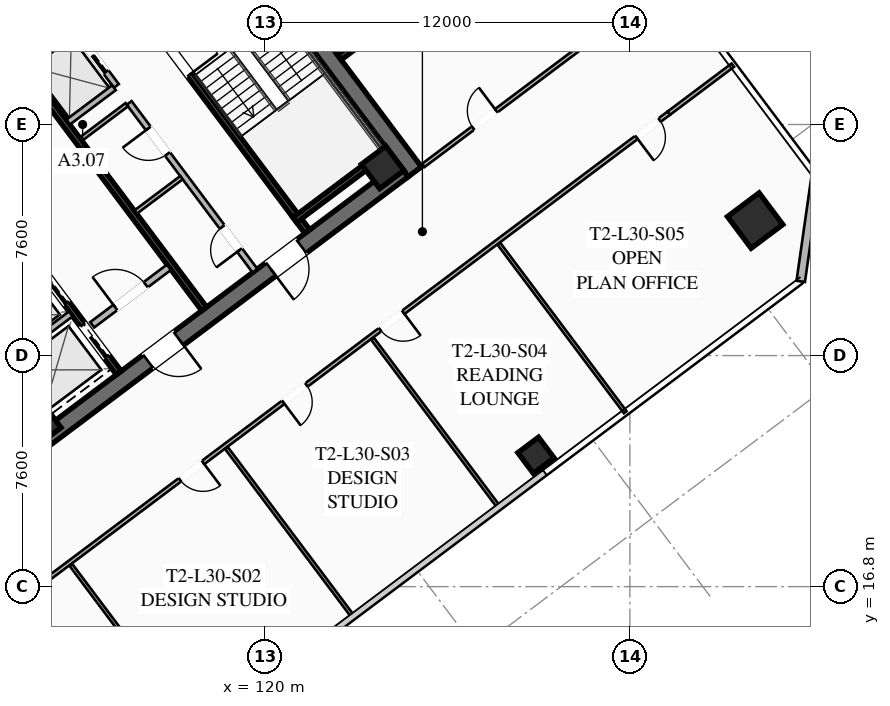
"""IFC4 building model, lengths in metres.
Left out: names, types, materials, properties, quantities, classifications, styles, units other than length and angle.
Written with IfcOpenShell. Run it as: python <this file> out.ifc"""

import sys

from ifc_helpers import new_model, si_unit, direction, frame, frame_2d, origin, origin_2d, place, context, subcontext, project, spatial, rectangle, hollow_rectangle, extrude, element, fill, save


model = new_model("IFC4")
c1 = context("Model", 3, precision=1e-05, world=origin(), true_north=direction((0.0, 1.0)))
c2 = subcontext(c1, "Body", "Model", "MODEL_VIEW")
j1 = project(units=[si_unit("LENGTHUNIT", "METRE"), si_unit("PLANEANGLEUNIT", "RADIAN")], contexts=[c1])
p1 = place(None, origin())
s1 = spatial("IfcSite", under=j1, at=p1, CompositionType="ELEMENT")
p2 = place(p1, origin())
s2 = spatial("IfcBuilding", under=s1, at=p2, CompositionType="ELEMENT")
p3 = place(p2, frame((0.0, 0.0, 114.4)))
s3 = spatial("IfcBuildingStorey", under=s2, at=p3, CompositionType="ELEMENT", Elevation=114.4)
p4 = place(p3, frame((115.564, 42.923, 0.0), z_axis=(0.0, 0.0, 1.0), x_axis=(0.600005007985, -0.799996243986, 0.0)))
e1 = element("IfcWall", 1, at=p4, inside=s3, PredefinedType="SHEAR", context=c2, shape_type="SweptSolid", body=[
    extrude(rectangle(XDim=15.6, YDim=0.55, at=frame_2d((7.8, 0.0))), origin(), (0.0, 0.0, 1.0), 3.55),
])
p5 = place(p3, frame((124.539, 30.498, 0.0), z_axis=(0.0, 0.0, 1.0), x_axis=(-0.799998054672, -0.600002593761, 0.0)))
e2 = element("IfcWall", 2, at=p5, inside=s3, PredefinedType="SHEAR", context=c2, shape_type="SweptSolid", body=[
    extrude(rectangle(XDim=15.06, YDim=0.55, at=frame_2d((7.53, 0.0))), origin(), (0.0, 0.0, 1.0), 3.55),
])
p6 = place(p5, frame((9.23, 0.0, 0.0)))
e3 = element("IfcOpeningElement", 3, at=p6, cuts=e2, PredefinedType="OPENING", context=c2, shape_type="SweptSolid", body=[
    extrude(rectangle(XDim=1.25, YDim=2.25, at=frame_2d((0.625, 1.125))), frame((0.0, 0.285, 0.0), z_axis=(0.0, -1.0, 0.0), x_axis=(1.0, 0.0, 0.0)), (0.0, 0.0, 1.0), 0.57),
])
p7 = place(p5, frame((4.18, 0.0, 0.0)))
e4 = element("IfcOpeningElement", 4, at=p7, cuts=e2, PredefinedType="OPENING", context=c2, shape_type="SweptSolid", body=[
    extrude(rectangle(XDim=1.25, YDim=2.25, at=frame_2d((0.625, 1.125))), frame((0.0, 0.285, 0.0), z_axis=(0.0, -1.0, 0.0), x_axis=(1.0, 0.0, 0.0)), (0.0, 0.0, 1.0), 0.57),
])
p8 = place(p3, frame((103.461, 33.502, 0.0), z_axis=(0.0, 0.0, 1.0), x_axis=(0.799998054672, 0.600002593761, 0.0)))
e5 = element("IfcWall", 5, at=p8, inside=s3, PredefinedType="SHEAR", context=c2, shape_type="SweptSolid", body=[
    extrude(rectangle(XDim=15.06, YDim=0.55, at=frame_2d((7.53, 0.0))), origin(), (0.0, 0.0, 1.0), 3.55),
])
p9 = place(p8, frame((4.58, 0.0, 0.0)))
e6 = element("IfcOpeningElement", 6, at=p9, cuts=e5, PredefinedType="OPENING", context=c2, shape_type="SweptSolid", body=[
    extrude(rectangle(XDim=1.25, YDim=2.25, at=frame_2d((0.625, 1.125))), frame((0.0, 0.285, 0.0), z_axis=(0.0, -1.0, 0.0), x_axis=(1.0, 0.0, 0.0)), (0.0, 0.0, 1.0), 0.57),
])
p10 = place(p8, frame((9.63, 0.0, 0.0)))
e7 = element("IfcOpeningElement", 7, at=p10, cuts=e5, PredefinedType="OPENING", context=c2, shape_type="SweptSolid", body=[
    extrude(rectangle(XDim=1.25, YDim=2.25, at=frame_2d((0.625, 1.125))), frame((0.0, 0.285, 0.0), z_axis=(0.0, -1.0, 0.0), x_axis=(1.0, 0.0, 0.0)), (0.0, 0.0, 1.0), 0.57),
])
for number, where, z_axis, x_axis in (
    (8, (112.59, 22.13, 0.0), (0.0, 0.0, 1.0), (0.8, 0.6, 0.0)),
    (9, (123.87, 30.59, 0.0), (0.0, 0.0, 1.0), (0.8, 0.6, 0.0)),
):
    element("IfcColumn", number, at=place(p3, frame(where, z_axis=z_axis, x_axis=x_axis)), inside=s3, PredefinedType="COLUMN", context=c2, shape_type="SweptSolid", body=[
        extrude(hollow_rectangle(XDim=1.0, YDim=1.0, WallThickness=0.04, at=origin_2d()), origin(), (0.0, 0.0, 1.0), 3.37),
    ])
p11 = place(p3, frame((136.12, 28.84, 0.0), z_axis=(0.0, 0.0, 1.0), x_axis=(0.799999996291, 0.600000004945, 0.0)))
e10 = element("IfcColumn", 10, at=p11, inside=s3, PredefinedType="COLUMN", context=c2, shape_type="SweptSolid", body=[
    extrude(hollow_rectangle(XDim=1.3, YDim=1.3, WallThickness=0.05, at=origin_2d()), origin(), (0.0, 0.0, 1.0), 3.37),
])
p12 = place(p3, frame((128.91, 21.12, 0.0), z_axis=(0.0, 0.0, 1.0), x_axis=(0.799999996291, 0.600000004945, 0.0)))
e11 = element("IfcColumn", 11, at=p12, inside=s3, PredefinedType="COLUMN", context=c2, shape_type="SweptSolid", body=[
    extrude(hollow_rectangle(XDim=0.85, YDim=0.85, WallThickness=0.035, at=origin_2d()), origin(), (0.0, 0.0, 1.0), 3.37),
])
p13 = place(p3, frame((138.12, 30.34, 0.0), z_axis=(0.0, 0.0, 1.0), x_axis=(-0.141421356237, -0.989949493661, 0.0)))
e12 = element("IfcWall", 12, at=p13, inside=s3, PredefinedType="SOLIDWALL", context=c2, shape_type="SweptSolid", body=[
    extrude(rectangle(XDim=3.536, YDim=0.28, at=frame_2d((1.768, 0.0))), origin(), (0.0, 0.0, 1.0), 3.37),
])
p14 = place(p3, frame((116.56, 34.92, 0.0), z_axis=(0.0, 0.0, 1.0), x_axis=(0.59999029481, -0.8000072788, 0.0)))
e13 = element("IfcWall", 13, at=p14, inside=s3, PredefinedType="SHEAR", context=c2, shape_type="SweptSolid", body=[
    extrude(rectangle(XDim=8.05, YDim=0.2, at=frame_2d((4.025, 0.0))), origin(), (0.0, 0.0, 1.0), 3.37),
])
p15 = place(p14, frame((0.45, 0.0, 0.0)))
e14 = element("IfcOpeningElement", 14, at=p15, cuts=e13, PredefinedType="OPENING", context=c2, shape_type="SweptSolid", body=[
    extrude(rectangle(XDim=1.15, YDim=2.2, at=frame_2d((0.575, 1.1))), frame((0.0, 0.11, 0.0), z_axis=(0.0, -1.0, 0.0), x_axis=(1.0, 0.0, 0.0)), (0.0, 0.0, 1.0), 0.22),
])
p16 = place(p3, frame((120.98, 28.86, 0.0), z_axis=(0.0, 0.0, 1.0), x_axis=(0.800015298837, 0.599979601008, 0.0)))
e15 = element("IfcWall", 15, at=p16, inside=s3, PredefinedType="SHEAR", context=c2, shape_type="SweptSolid", body=[
    extrude(rectangle(XDim=3.83, YDim=0.2, at=frame_2d((1.915, 0.0))), origin(), (0.0, 0.0, 1.0), 3.37),
])
p17 = place(p3, frame((117.998, 25.936, 0.0), z_axis=(0.0, 0.0, 1.0), x_axis=(-0.600002693989, 0.799997979501, 0.0)))
e16 = element("IfcWall", 16, at=p17, inside=s3, PredefinedType="SHEAR", context=c2, shape_type="SweptSolid", body=[
    extrude(rectangle(XDim=14.5, YDim=0.2, at=frame_2d((7.25, 0.0))), origin(), (0.0, 0.0, 1.0), 3.37),
])
p18 = place(p3, frame((114.316, 25.412, 0.0), z_axis=(0.0, 0.0, 1.0), x_axis=(0.800018601094, 0.59997519774, 0.0)))
e17 = element("IfcWall", 17, at=p18, inside=s3, PredefinedType="SOLIDWALL", context=c2, shape_type="SweptSolid", body=[
    extrude(rectangle(XDim=3.15, YDim=0.22, at=frame_2d((1.575, 0.0))), origin(), (0.0, 0.0, 1.0), 2.723),
])
p19 = place(p18, frame((0.95, 0.0, 0.0)))
e18 = element("IfcOpeningElement", 18, at=p19, cuts=e17, PredefinedType="OPENING", context=c2, shape_type="SweptSolid", body=[
    extrude(rectangle(XDim=1.25, YDim=2.25, at=frame_2d((0.625, 1.125))), frame((0.0, 0.12, 0.0), z_axis=(0.0, -1.0, 0.0), x_axis=(1.0, 0.0, 0.0)), (0.0, 0.0, 1.0), 0.24),
])
p20 = place(p3, frame((115.19, 23.83, 0.0), z_axis=(0.0, 0.0, 1.0), x_axis=(-0.599993943644, 0.800004542231, 0.0)))
e19 = element("IfcWall", 19, at=p20, inside=s3, PredefinedType="SHEAR", context=c2, shape_type="SweptSolid", body=[
    extrude(rectangle(XDim=6.45, YDim=0.2, at=frame_2d((3.225, 0.0))), origin(), (0.0, 0.0, 1.0), 3.37),
])
p21 = place(p20, frame((4.875, 0.0, 0.0)))
e20 = element("IfcOpeningElement", 20, at=p21, cuts=e19, PredefinedType="OPENING", context=c2, shape_type="SweptSolid", body=[
    extrude(rectangle(XDim=1.3, YDim=2.25, at=frame_2d((0.65, 1.125))), frame((0.0, 0.11, 0.0), z_axis=(0.0, -1.0, 0.0), x_axis=(1.0, 0.0, 0.0)), (0.0, 0.0, 1.0), 0.22),
])
p22 = place(p20, frame((2.875, 0.0, 0.0)))
e21 = element("IfcOpeningElement", 21, at=p22, cuts=e19, PredefinedType="OPENING", context=c2, shape_type="SweptSolid", body=[
    extrude(rectangle(XDim=1.3, YDim=2.25, at=frame_2d((0.65, 1.125))), frame((0.0, 0.11, 0.0), z_axis=(0.0, -1.0, 0.0), x_axis=(1.0, 0.0, 0.0)), (0.0, 0.0, 1.0), 0.22),
])
p23 = place(p20, frame((0.675, 0.0, 0.0)))
e22 = element("IfcOpeningElement", 22, at=p23, cuts=e19, PredefinedType="OPENING", context=c2, shape_type="SweptSolid", body=[
    extrude(rectangle(XDim=1.3, YDim=2.25, at=frame_2d((0.65, 1.125))), frame((0.0, 0.11, 0.0), z_axis=(0.0, -1.0, 0.0), x_axis=(1.0, 0.0, 0.0)), (0.0, 0.0, 1.0), 0.22),
])
p24 = place(p3, frame((110.826, 23.682, 0.0), z_axis=(0.0, 0.0, 1.0), x_axis=(0.8, 0.6, 0.0)))
e23 = element("IfcWall", 23, at=p24, inside=s3, PredefinedType="SOLIDWALL", context=c2, shape_type="SweptSolid", body=[
    extrude(rectangle(XDim=3.48, YDim=0.2, at=frame_2d((1.74, 0.0))), origin(), (0.0, 0.0, 1.0), 3.37),
])
p25 = place(p3, frame((119.67, 27.19, 0.0), z_axis=(0.0, 0.0, 1.0), x_axis=(-0.599988677396, 0.800008491828, 0.0)))
e24 = element("IfcWall", 24, at=p25, inside=s3, PredefinedType="SOLIDWALL", context=c2, shape_type="SweptSolid", body=[
    extrude(rectangle(XDim=6.9, YDim=0.2, at=frame_2d((3.45, 0.0))), origin(), (0.0, 0.0, 1.0), 2.723),
])
p26 = place(p25, frame((0.85, 0.0, 0.0)))
e25 = element("IfcOpeningElement", 25, at=p26, cuts=e24, PredefinedType="OPENING", context=c2, shape_type="SweptSolid", body=[
    extrude(rectangle(XDim=0.95, YDim=2.05, at=frame_2d((0.475, 1.025))), frame((0.0, 0.11, 0.0), z_axis=(0.0, -1.0, 0.0), x_axis=(1.0, 0.0, 0.0)), (0.0, 0.0, 1.0), 0.22),
])
p27 = place(p25, frame((4.8, 0.0, 0.0)))
e26 = element("IfcOpeningElement", 26, at=p27, cuts=e24, PredefinedType="OPENING", context=c2, shape_type="SweptSolid", body=[
    extrude(rectangle(XDim=1.05, YDim=2.2, at=frame_2d((0.525, 1.1))), frame((0.0, 0.11, 0.0), z_axis=(0.0, -1.0, 0.0), x_axis=(1.0, 0.0, 0.0)), (0.0, 0.0, 1.0), 0.22),
])
for number, where, z_axis, x_axis in (
    (27, (113.946, 31.522, 0.0), (0.0, 0.0, 1.0), (0.8, 0.6, 0.0)),
    (28, (115.746, 29.122, 0.0), (0.0, 0.0, 1.0), (0.8, 0.6, 0.0)),
):
    element("IfcWall", number, at=place(p3, frame(where, z_axis=z_axis, x_axis=x_axis)), inside=s3, PredefinedType="PARTITIONING", context=c2, shape_type="SweptSolid", body=[
        extrude(rectangle(XDim=1.88, YDim=0.135, at=frame_2d((0.94, 0.0))), origin(), (0.0, 0.0, 1.0), 2.723),
    ])
p28 = place(p3, frame((115.11, 33.27, 0.0), z_axis=(0.0, 0.0, 1.0), x_axis=(-0.600011322243, 0.799991508192, 0.0)))
e29 = element("IfcWall", 29, at=p28, inside=s3, PredefinedType="SOLIDWALL", context=c2, shape_type="SweptSolid", body=[
    extrude(rectangle(XDim=6.9, YDim=0.2, at=frame_2d((3.45, 0.0))), origin(), (0.0, 0.0, 1.0), 3.37),
])
p29 = place(p28, frame((0.575, 0.0, 0.0)))
e30 = element("IfcOpeningElement", 30, at=p29, cuts=e29, PredefinedType="OPENING", context=c2, shape_type="SweptSolid", body=[
    extrude(rectangle(XDim=1.1, YDim=2.2, at=frame_2d((0.55, 1.1))), frame((0.0, 0.11, 0.0), z_axis=(0.0, -1.0, 0.0), x_axis=(1.0, 0.0, 0.0)), (0.0, 0.0, 1.0), 0.22),
])
p30 = place(p28, frame((2.825, 0.0, 0.0)))
e31 = element("IfcOpeningElement", 31, at=p30, cuts=e29, PredefinedType="OPENING", context=c2, shape_type="SweptSolid", body=[
    extrude(rectangle(XDim=1.1, YDim=2.2, at=frame_2d((0.55, 1.1))), frame((0.0, 0.11, 0.0), z_axis=(0.0, -1.0, 0.0), x_axis=(1.0, 0.0, 0.0)), (0.0, 0.0, 1.0), 0.22),
])
p31 = place(p28, frame((5.075, 0.0, 0.0)))
e32 = element("IfcOpeningElement", 32, at=p31, cuts=e29, PredefinedType="OPENING", context=c2, shape_type="SweptSolid", body=[
    extrude(rectangle(XDim=1.1, YDim=2.2, at=frame_2d((0.55, 1.1))), frame((0.0, 0.11, 0.0), z_axis=(0.0, -1.0, 0.0), x_axis=(1.0, 0.0, 0.0)), (0.0, 0.0, 1.0), 0.22),
])
p32 = place(p3, frame((113.526, 32.082, 0.0), z_axis=(0.0, 0.0, 1.0), x_axis=(0.800046745961, 0.599937666993, 0.0)))
e33 = element("IfcWall", 33, at=p32, inside=s3, PredefinedType="SOLIDWALL", context=c2, shape_type="SweptSolid", body=[
    extrude(rectangle(XDim=1.88, YDim=0.2, at=frame_2d((0.94, 0.0))), origin(), (0.0, 0.0, 1.0), 3.37),
])
p33 = place(p3, frame((112.176, 33.882, 0.0), z_axis=(0.0, 0.0, 1.0), x_axis=(0.8, 0.6, 0.0)))
e34 = element("IfcWall", 34, at=p33, inside=s3, PredefinedType="SOLIDWALL", context=c2, shape_type="SweptSolid", body=[
    extrude(rectangle(XDim=1.88, YDim=0.2, at=frame_2d((0.94, 0.0))), origin(), (0.0, 0.0, 1.0), 3.37),
])
p34 = place(p3, frame((122.444, 34.208, 0.0), z_axis=(0.0, 0.0, 1.0), x_axis=(0.79999138319, 0.600011488909, 0.0)))
e35 = element("IfcWall", 35, at=p34, inside=s3, PredefinedType="SHEAR", context=c2, shape_type="SweptSolid", body=[
    extrude(rectangle(XDim=3.4, YDim=0.2, at=frame_2d((1.7, 0.0))), origin(), (0.0, 0.0, 1.0), 3.37),
])
p35 = place(p3, frame((95.87, 30.09, 0.0), z_axis=(0.0, 0.0, 1.0), x_axis=(0.799997191971, 0.600003744021, 0.0)))
e36 = element("IfcWall", 36, at=p35, inside=s3, PredefinedType="PARTITIONING", context=c2, shape_type="SweptSolid", body=[
    extrude(rectangle(XDim=31.3, YDim=0.135, at=frame_2d((15.65, 0.0))), origin(), (0.0, 0.0, 1.0), 2.723),
])
p36 = place(p35, frame((0.3, 0.0, 0.0)))
e37 = element("IfcOpeningElement", 37, at=p36, cuts=e36, PredefinedType="OPENING", context=c2, shape_type="SweptSolid", body=[
    extrude(rectangle(XDim=0.95, YDim=2.05, at=frame_2d((0.475, 1.025))), frame((0.0, 0.077, 0.0), z_axis=(0.0, -1.0, 0.0), x_axis=(1.0, 0.0, 0.0)), (0.0, 0.0, 1.0), 0.155),
])
p37 = place(p35, frame((30.05, 0.0, 0.0)))
e38 = element("IfcOpeningElement", 38, at=p37, cuts=e36, PredefinedType="OPENING", context=c2, shape_type="SweptSolid", body=[
    extrude(rectangle(XDim=0.95, YDim=2.05, at=frame_2d((0.475, 1.025))), frame((0.0, 0.077, 0.0), z_axis=(0.0, -1.0, 0.0), x_axis=(1.0, 0.0, 0.0)), (0.0, 0.0, 1.0), 0.155),
])
p38 = place(p3, frame((133.282, 32.374, 0.0), z_axis=(0.0, 0.0, 1.0), x_axis=(-0.8, -0.6, 0.0)))
e39 = element("IfcWall", 39, at=p38, inside=s3, PredefinedType="PARTITIONING", context=c2, shape_type="SweptSolid", body=[
    extrude(rectangle(XDim=31.3, YDim=0.135, at=frame_2d((15.65, 0.0))), origin(), (0.0, 0.0, 1.0), 2.723),
])
p39 = place(p38, frame((29.97, 0.0, 0.0)))
e40 = element("IfcOpeningElement", 40, at=p39, cuts=e39, PredefinedType="OPENING", context=c2, shape_type="SweptSolid", body=[
    extrude(rectangle(XDim=0.95, YDim=2.05, at=frame_2d((0.475, 1.025))), frame((0.0, 0.077, 0.0), z_axis=(0.0, -1.0, 0.0), x_axis=(1.0, 0.0, 0.0)), (0.0, 0.0, 1.0), 0.155),
])
p40 = place(p38, frame((19.151, 0.0, 0.0)))
e41 = element("IfcOpeningElement", 41, at=p40, cuts=e39, PredefinedType="OPENING", context=c2, shape_type="SweptSolid", body=[
    extrude(rectangle(XDim=0.95, YDim=2.05, at=frame_2d((0.475, 1.025))), frame((0.0, 0.077, 0.0), z_axis=(0.0, -1.0, 0.0), x_axis=(1.0, 0.0, 0.0)), (0.0, 0.0, 1.0), 0.155),
])
p41 = place(p38, frame((14.901, 0.0, 0.0)))
e42 = element("IfcOpeningElement", 42, at=p41, cuts=e39, PredefinedType="OPENING", context=c2, shape_type="SweptSolid", body=[
    extrude(rectangle(XDim=0.95, YDim=2.05, at=frame_2d((0.475, 1.025))), frame((0.0, 0.077, 0.0), z_axis=(0.0, -1.0, 0.0), x_axis=(1.0, 0.0, 0.0)), (0.0, 0.0, 1.0), 0.155),
])
p42 = place(p38, frame((10.92, 0.0, 0.0)))
e43 = element("IfcOpeningElement", 43, at=p42, cuts=e39, PredefinedType="OPENING", context=c2, shape_type="SweptSolid", body=[
    extrude(rectangle(XDim=0.95, YDim=2.05, at=frame_2d((0.475, 1.025))), frame((0.0, 0.077, 0.0), z_axis=(0.0, -1.0, 0.0), x_axis=(1.0, 0.0, 0.0)), (0.0, 0.0, 1.0), 0.155),
])
p43 = place(p38, frame((0.38, 0.0, 0.0)))
e44 = element("IfcOpeningElement", 44, at=p43, cuts=e39, PredefinedType="OPENING", context=c2, shape_type="SweptSolid", body=[
    extrude(rectangle(XDim=0.95, YDim=2.05, at=frame_2d((0.475, 1.025))), frame((0.0, 0.077, 0.0), z_axis=(0.0, -1.0, 0.0), x_axis=(1.0, 0.0, 0.0)), (0.0, 0.0, 1.0), 0.155),
])
p44 = place(p3, frame((133.282, 32.374, 0.0), z_axis=(0.0, 0.0, 1.0), x_axis=(0.80002227902, 0.599970293491, 0.0)))
e45 = element("IfcWall", 45, at=p44, inside=s3, PredefinedType="PARTITIONING", context=c2, shape_type="SweptSolid", body=[
    extrude(rectangle(XDim=2.63, YDim=0.135, at=frame_2d((1.315, 0.0))), origin(), (0.0, 0.0, 1.0), 2.723),
])
p45 = place(p3, frame((117.768, 11.976, 0.0), z_axis=(0.0, 0.0, 1.0), x_axis=(-0.6, 0.8, 0.0)))
e46 = element("IfcWall", 46, at=p45, inside=s3, PredefinedType="PARTITIONING", context=c2, shape_type="SweptSolid", body=[
    extrude(rectangle(XDim=6.93, YDim=0.11, at=frame_2d((3.465, 0.0))), origin(), (0.0, 0.0, 1.0), 2.723),
])
p46 = place(p3, frame((122.888, 15.816, 0.0), z_axis=(0.0, 0.0, 1.0), x_axis=(-0.599983090003, 0.800012682219, 0.0)))
e47 = element("IfcWall", 47, at=p46, inside=s3, PredefinedType="PARTITIONING", context=c2, shape_type="SweptSolid", body=[
    extrude(rectangle(XDim=6.93, YDim=0.11, at=frame_2d((3.465, 0.0))), origin(), (0.0, 0.0, 1.0), 2.723),
])
p47 = place(p3, frame((127.688, 19.416, 0.0), z_axis=(0.0, 0.0, 1.0), x_axis=(-0.6, 0.8, 0.0)))
e48 = element("IfcWall", 48, at=p47, inside=s3, PredefinedType="PARTITIONING", context=c2, shape_type="SweptSolid", body=[
    extrude(rectangle(XDim=6.93, YDim=0.11, at=frame_2d((3.465, 0.0))), origin(), (0.0, 0.0, 1.0), 2.723),
])
p48 = place(p3, frame((131.848, 22.536, 0.0), z_axis=(0.0, 0.0, 1.0), x_axis=(-0.599983090003, 0.800012682219, 0.0)))
e49 = element("IfcWall", 49, at=p48, inside=s3, PredefinedType="PARTITIONING", context=c2, shape_type="SweptSolid", body=[
    extrude(rectangle(XDim=6.93, YDim=0.11, at=frame_2d((3.465, 0.0))), origin(), (0.0, 0.0, 1.0), 2.723),
])
p49 = place(p3, frame((125.208, 30.656, 0.0), z_axis=(0.0, 0.0, 1.0), x_axis=(0.799997105034, 0.600003859935, 0.0)))
e50 = element("IfcWall", 50, at=p49, inside=s3, PredefinedType="PARTITIONING", context=c2, shape_type="SweptSolid", body=[
    extrude(rectangle(XDim=10.12, YDim=0.135, at=frame_2d((5.06, 0.0))), origin(), (0.0, 0.0, 1.0), 2.723),
])
p50 = place(p49, frame((2.045, 0.0, 0.0)))
e51 = element("IfcOpeningElement", 51, at=p50, cuts=e50, PredefinedType="OPENING", context=c2, shape_type="SweptSolid", body=[
    extrude(rectangle(XDim=0.95, YDim=2.05, at=frame_2d((0.475, 1.025))), frame((0.0, 0.077, 0.0), z_axis=(0.0, -1.0, 0.0), x_axis=(1.0, 0.0, 0.0)), (0.0, 0.0, 1.0), 0.155),
])
p51 = place(p6, origin())
e52 = element("IfcDoor", 52, at=p51, inside=s3, OperationType="SINGLE_SWING_LEFT", PredefinedType="DOOR", context=c2, shape_type="SweptSolid", body=[
    extrude(rectangle(XDim=1.25, YDim=2.25, at=frame_2d((0.625, 1.125))), frame((0.0, 0.025, 0.0), z_axis=(0.0, -1.0, 0.0), x_axis=(1.0, 0.0, 0.0)), (0.0, 0.0, 1.0), 0.05),
])
fill(e3, e52)
p52 = place(p7, origin())
e53 = element("IfcDoor", 53, at=p52, inside=s3, OperationType="SINGLE_SWING_RIGHT", PredefinedType="DOOR", context=c2, shape_type="SweptSolid", body=[
    extrude(rectangle(XDim=1.25, YDim=2.25, at=frame_2d((0.625, 1.125))), frame((0.0, 0.025, 0.0), z_axis=(0.0, -1.0, 0.0), x_axis=(1.0, 0.0, 0.0)), (0.0, 0.0, 1.0), 0.05),
])
fill(e4, e53)
p53 = place(p15, origin())
e54 = element("IfcDoor", 54, at=p53, inside=s3, OperationType="SINGLE_SWING_RIGHT", PredefinedType="DOOR", context=c2, shape_type="SweptSolid", body=[
    extrude(rectangle(XDim=1.15, YDim=2.2, at=frame_2d((0.575, 1.1))), frame((0.0, 0.025, 0.0), z_axis=(0.0, -1.0, 0.0), x_axis=(1.0, 0.0, 0.0)), (0.0, 0.0, 1.0), 0.05),
])
fill(e14, e54)
p54 = place(p19, origin())
e55 = element("IfcDoor", 55, at=p54, inside=s3, OperationType="SINGLE_SWING_LEFT", PredefinedType="DOOR", context=c2, shape_type="SweptSolid", body=[
    extrude(rectangle(XDim=1.25, YDim=2.25, at=frame_2d((0.625, 1.125))), frame((0.0, 0.025, 0.0), z_axis=(0.0, -1.0, 0.0), x_axis=(1.0, 0.0, 0.0)), (0.0, 0.0, 1.0), 0.05),
])
fill(e18, e55)
p55 = place(p26, origin())
e56 = element("IfcDoor", 56, at=p55, inside=s3, OperationType="SINGLE_SWING_LEFT", PredefinedType="DOOR", context=c2, shape_type="SweptSolid", body=[
    extrude(rectangle(XDim=0.95, YDim=2.05, at=frame_2d((0.475, 1.025))), frame((0.0, 0.025, 0.0), z_axis=(0.0, -1.0, 0.0), x_axis=(1.0, 0.0, 0.0)), (0.0, 0.0, 1.0), 0.05),
])
fill(e25, e56)
p56 = place(p27, origin())
e57 = element("IfcDoor", 57, at=p56, inside=s3, OperationType="SINGLE_SWING_RIGHT", PredefinedType="DOOR", context=c2, shape_type="SweptSolid", body=[
    extrude(rectangle(XDim=1.05, YDim=2.2, at=frame_2d((0.525, 1.1))), frame((0.0, 0.025, 0.0), z_axis=(0.0, -1.0, 0.0), x_axis=(1.0, 0.0, 0.0)), (0.0, 0.0, 1.0), 0.05),
])
fill(e26, e57)
p57 = place(p40, origin())
e58 = element("IfcDoor", 58, at=p57, inside=s3, OperationType="SINGLE_SWING_LEFT", PredefinedType="DOOR", context=c2, shape_type="SweptSolid", body=[
    extrude(rectangle(XDim=0.95, YDim=2.05, at=frame_2d((0.475, 1.025))), frame((0.0, 0.025, 0.0), z_axis=(0.0, -1.0, 0.0), x_axis=(1.0, 0.0, 0.0)), (0.0, 0.0, 1.0), 0.05),
])
fill(e41, e58)
p58 = place(p41, origin())
e59 = element("IfcDoor", 59, at=p58, inside=s3, OperationType="SINGLE_SWING_RIGHT", PredefinedType="DOOR", context=c2, shape_type="SweptSolid", body=[
    extrude(rectangle(XDim=0.95, YDim=2.05, at=frame_2d((0.475, 1.025))), frame((0.0, 0.025, 0.0), z_axis=(0.0, -1.0, 0.0), x_axis=(1.0, 0.0, 0.0)), (0.0, 0.0, 1.0), 0.05),
])
fill(e42, e59)
p59 = place(p42, origin())
e60 = element("IfcDoor", 60, at=p59, inside=s3, OperationType="SINGLE_SWING_LEFT", PredefinedType="DOOR", context=c2, shape_type="SweptSolid", body=[
    extrude(rectangle(XDim=0.95, YDim=2.05, at=frame_2d((0.475, 1.025))), frame((0.0, 0.025, 0.0), z_axis=(0.0, -1.0, 0.0), x_axis=(1.0, 0.0, 0.0)), (0.0, 0.0, 1.0), 0.05),
])
fill(e43, e60)
p60 = place(p43, origin())
e61 = element("IfcDoor", 61, at=p60, inside=s3, OperationType="SINGLE_SWING_RIGHT", PredefinedType="DOOR", context=c2, shape_type="SweptSolid", body=[
    extrude(rectangle(XDim=0.95, YDim=2.05, at=frame_2d((0.475, 1.025))), frame((0.0, 0.025, 0.0), z_axis=(0.0, -1.0, 0.0), x_axis=(1.0, 0.0, 0.0)), (0.0, 0.0, 1.0), 0.05),
])
fill(e44, e61)
p61 = place(p50, origin())
e62 = element("IfcDoor", 62, at=p61, inside=s3, OperationType="SINGLE_SWING_RIGHT", PredefinedType="DOOR", context=c2, shape_type="SweptSolid", body=[
    extrude(rectangle(XDim=0.95, YDim=2.05, at=frame_2d((0.475, 1.025))), frame((0.0, 0.025, 0.0), z_axis=(0.0, -1.0, 0.0), x_axis=(1.0, 0.0, 0.0)), (0.0, 0.0, 1.0), 0.05),
])
fill(e51, e62)
p62 = place(p22, origin())
e63 = element("IfcDoor", 63, at=p62, inside=s3, OperationType="SLIDING_TO_LEFT", PredefinedType="DOOR", context=c2, shape_type="SweptSolid", body=[
    extrude(rectangle(XDim=1.3, YDim=2.25, at=frame_2d((0.65, 1.125))), frame((0.0, 0.025, 0.0), z_axis=(0.0, -1.0, 0.0), x_axis=(1.0, 0.0, 0.0)), (0.0, 0.0, 1.0), 0.05),
])
fill(e21, e63)
p63 = place(p23, origin())
e64 = element("IfcDoor", 64, at=p63, inside=s3, OperationType="SLIDING_TO_LEFT", PredefinedType="DOOR", context=c2, shape_type="SweptSolid", body=[
    extrude(rectangle(XDim=1.3, YDim=2.25, at=frame_2d((0.65, 1.125))), frame((0.0, 0.025, 0.0), z_axis=(0.0, -1.0, 0.0), x_axis=(1.0, 0.0, 0.0)), (0.0, 0.0, 1.0), 0.05),
])
fill(e22, e64)
p64 = place(p29, origin())
e65 = element("IfcDoor", 65, at=p64, inside=s3, OperationType="SLIDING_TO_LEFT", PredefinedType="DOOR", context=c2, shape_type="SweptSolid", body=[
    extrude(rectangle(XDim=1.1, YDim=2.2, at=frame_2d((0.55, 1.1))), frame((0.0, 0.025, 0.0), z_axis=(0.0, -1.0, 0.0), x_axis=(1.0, 0.0, 0.0)), (0.0, 0.0, 1.0), 0.05),
])
fill(e30, e65)
save(model, sys.argv[1])
